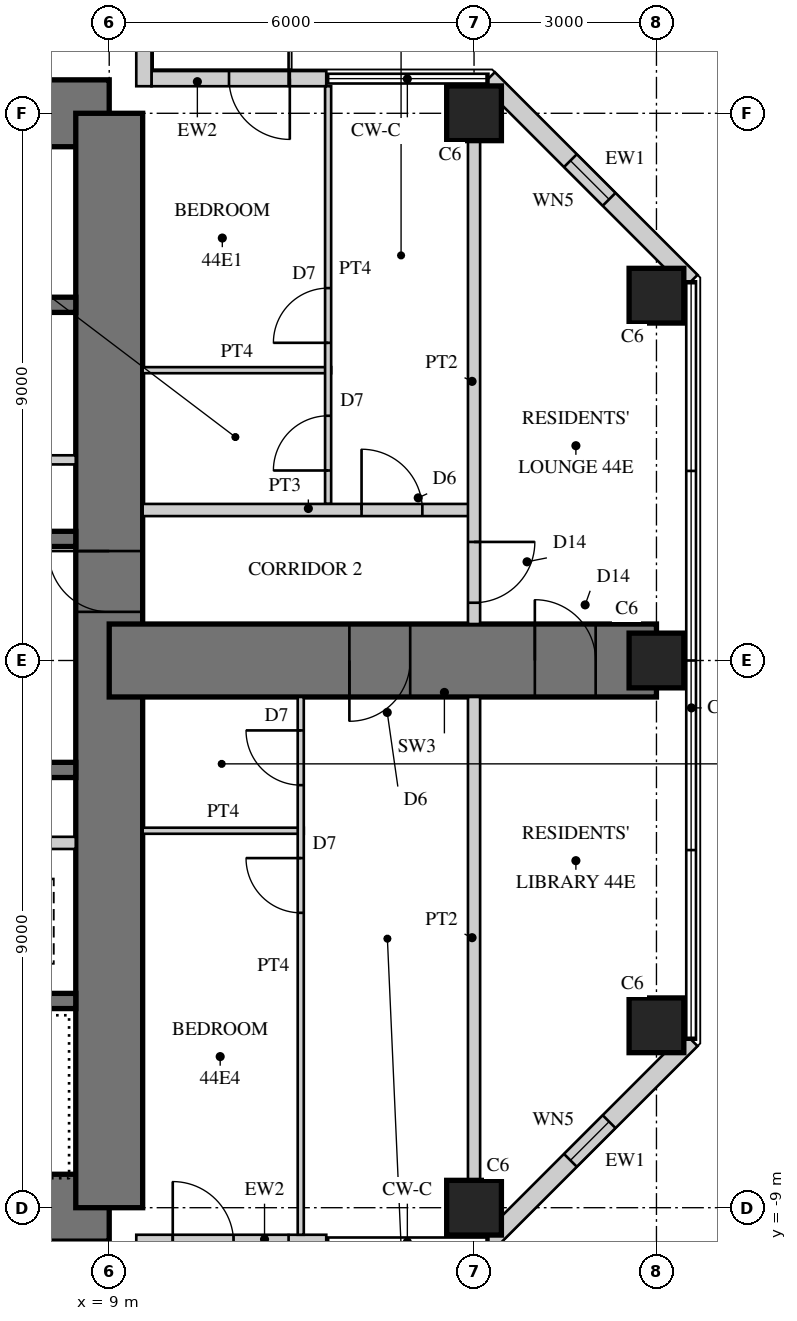
"""IFC4 building model, lengths in metres.
Left out: names, types, materials, properties, quantities, classifications, styles, units other than length and angle.
Written with IfcOpenShell. Run it as: python <this file> out.ifc"""

import sys

from ifc_helpers import new_model, si_unit, direction, frame, frame_2d, origin, origin_2d, place, context, subcontext, project, spatial, rectangle, hollow_rectangle, extrude, element, fill, save


model = new_model("IFC4")
c1 = context("Model", 3, precision=1e-05, world=origin(), true_north=direction((0.0, 1.0)))
c2 = subcontext(c1, "Body", "Model", "MODEL_VIEW")
j1 = project(units=[si_unit("LENGTHUNIT", "METRE"), si_unit("PLANEANGLEUNIT", "RADIAN")], contexts=[c1])
p1 = place(None, origin())
s1 = spatial("IfcSite", under=j1, at=p1, CompositionType="ELEMENT")
p2 = place(p1, origin())
s2 = spatial("IfcBuilding", under=s1, at=p2, CompositionType="ELEMENT")
p3 = place(p2, frame((0.0, 0.0, 179.7)))
s3 = spatial("IfcBuildingStorey", under=s2, at=p3, CompositionType="ELEMENT", Elevation=179.7)
p4 = place(p3, frame((9.0, 9.0, 0.0), z_axis=(0.0, 0.0, 1.0), x_axis=(-1.0, 0.0, 0.0)))
e1 = element("IfcWall", 1, at=p4, inside=s3, PredefinedType="SHEAR", context=c2, shape_type="SweptSolid", body=[
    extrude(rectangle(XDim=18.0, YDim=1.1, at=frame_2d((9.0, 0.0))), origin(), (0.0, 0.0, 1.0), 3.4),
])
p5 = place(p4, frame((9.8, 0.0, 0.0)))
e2 = element("IfcOpeningElement", 2, at=p5, cuts=e1, PredefinedType="OPENING", context=c2, shape_type="SweptSolid", body=[
    extrude(rectangle(XDim=1.0, YDim=2.4, at=frame_2d((0.5, 1.2))), frame((0.0, 0.56, 0.0), z_axis=(0.0, -1.0, 0.0), x_axis=(1.0, 0.0, 0.0)), (0.0, 0.0, 1.0), 1.12),
])
p6 = place(p3, frame((-9.0, -9.0, 0.0), z_axis=(0.0, 0.0, 1.0), x_axis=(1.0, 0.0, 0.0)))
e3 = element("IfcWall", 3, at=p6, inside=s3, PredefinedType="SHEAR", context=c2, shape_type="SweptSolid", body=[
    extrude(rectangle(XDim=18.0, YDim=1.1, at=frame_2d((9.0, 0.0))), origin(), (0.0, 0.0, 1.0), 3.4),
])
p7 = place(p6, frame((9.8, 0.0, 0.0)))
e4 = element("IfcOpeningElement", 4, at=p7, cuts=e3, PredefinedType="OPENING", context=c2, shape_type="SweptSolid", body=[
    extrude(rectangle(XDim=1.0, YDim=2.4, at=frame_2d((0.5, 1.2))), frame((0.0, 0.56, 0.0), z_axis=(0.0, -1.0, 0.0), x_axis=(1.0, 0.0, 0.0)), (0.0, 0.0, 1.0), 1.12),
])
p8 = place(p3, frame((9.0, -9.0, 0.0), z_axis=(0.0, 0.0, 1.0), x_axis=(0.0, 1.0, 0.0)))
e5 = element("IfcWall", 5, at=p8, inside=s3, PredefinedType="SHEAR", context=c2, shape_type="SweptSolid", body=[
    extrude(rectangle(XDim=18.0, YDim=1.1, at=frame_2d((9.0, 0.0))), origin(), (0.0, 0.0, 1.0), 3.4),
])
p9 = place(p8, frame((9.8, 0.0, 0.0)))
e6 = element("IfcOpeningElement", 6, at=p9, cuts=e5, PredefinedType="OPENING", context=c2, shape_type="SweptSolid", body=[
    extrude(rectangle(XDim=1.0, YDim=2.4, at=frame_2d((0.5, 1.2))), frame((0.0, 0.56, 0.0), z_axis=(0.0, -1.0, 0.0), x_axis=(1.0, 0.0, 0.0)), (0.0, 0.0, 1.0), 1.12),
])
p10 = place(p3, frame((1.925, 2.0, 0.0), z_axis=(0.0, 0.0, 1.0), x_axis=(1.0, 0.0, 0.0)))
e7 = element("IfcWall", 7, at=p10, inside=s3, PredefinedType="SHEAR", context=c2, shape_type="SweptSolid", body=[
    extrude(rectangle(XDim=6.525, YDim=0.25, at=frame_2d((3.262, 0.0))), origin(), (0.0, 0.0, 1.0), 3.4),
])
p11 = place(p3, frame((1.925, 5.85, 0.0), z_axis=(0.0, 0.0, 1.0), x_axis=(1.0, 0.0, 0.0)))
e8 = element("IfcWall", 8, at=p11, inside=s3, PredefinedType="SHEAR", context=c2, shape_type="SweptSolid", body=[
    extrude(rectangle(XDim=6.525, YDim=0.25, at=frame_2d((3.262, 0.0))), origin(), (0.0, 0.0, 1.0), 3.4),
])
p12 = place(p11, frame((0.521, 0.0, 0.0)))
e9 = element("IfcOpeningElement", 9, at=p12, cuts=e8, PredefinedType="OPENING", context=c2, shape_type="SweptSolid", body=[
    extrude(rectangle(XDim=1.0, YDim=2.1, at=frame_2d((0.5, 1.05))), frame((0.0, 0.135, 0.0), z_axis=(0.0, -1.0, 0.0), x_axis=(1.0, 0.0, 0.0)), (0.0, 0.0, 1.0), 0.27),
])
p13 = place(p3, frame((1.925, 3.3, 0.0), z_axis=(0.0, 0.0, 1.0), x_axis=(1.0, 0.0, 0.0)))
e10 = element("IfcWall", 10, at=p13, inside=s3, PredefinedType="PARTITIONING", context=c2, shape_type="SweptSolid", body=[
    extrude(rectangle(XDim=6.525, YDim=0.15, at=frame_2d((3.262, 0.0))), origin(), (0.0, 0.0, 1.0), 3.4),
])
p14 = place(p13, frame((0.075, 0.0, 0.0)))
e11 = element("IfcOpeningElement", 11, at=p14, cuts=e10, PredefinedType="OPENING", context=c2, shape_type="SweptSolid", body=[
    extrude(rectangle(XDim=0.8, YDim=2.1, at=frame_2d((0.4, 1.05))), frame((0.0, 0.085, 0.0), z_axis=(0.0, -1.0, 0.0), x_axis=(1.0, 0.0, 0.0)), (0.0, 0.0, 1.0), 0.17),
])
p15 = place(p13, frame((3.675, 0.0, 0.0)))
e12 = element("IfcOpeningElement", 12, at=p15, cuts=e10, PredefinedType="OPENING", context=c2, shape_type="SweptSolid", body=[
    extrude(rectangle(XDim=0.8, YDim=2.1, at=frame_2d((0.4, 1.05))), frame((0.0, 0.085, 0.0), z_axis=(0.0, -1.0, 0.0), x_axis=(1.0, 0.0, 0.0)), (0.0, 0.0, 1.0), 0.17),
])
p16 = place(p3, frame((2.125, -1.8, 0.0), z_axis=(0.0, 0.0, 1.0), x_axis=(1.0, 0.0, 0.0)))
e13 = element("IfcWall", 13, at=p16, inside=s3, PredefinedType="SHEAR", context=c2, shape_type="SweptSolid", body=[
    extrude(rectangle(XDim=6.325, YDim=0.25, at=frame_2d((3.163, 0.0))), origin(), (0.0, 0.0, 1.0), 3.4),
])
p17 = place(p3, frame((2.125, -5.6, 0.0), z_axis=(0.0, 0.0, 1.0), x_axis=(1.0, 0.0, 0.0)))
e14 = element("IfcWall", 14, at=p17, inside=s3, PredefinedType="SHEAR", context=c2, shape_type="SweptSolid", body=[
    extrude(rectangle(XDim=6.325, YDim=0.25, at=frame_2d((3.163, 0.0))), origin(), (0.0, 0.0, 1.0), 3.4),
])
p18 = place(p17, frame((0.175, 0.0, 0.0)))
e15 = element("IfcOpeningElement", 15, at=p18, cuts=e14, PredefinedType="OPENING", context=c2, shape_type="SweptSolid", body=[
    extrude(rectangle(XDim=1.0, YDim=2.1, at=frame_2d((0.5, 1.05))), frame((0.0, 0.135, 0.0), z_axis=(0.0, -1.0, 0.0), x_axis=(1.0, 0.0, 0.0)), (0.0, 0.0, 1.0), 0.27),
])
p19 = place(p3, frame((5.725, -3.0, 0.0), z_axis=(0.0, 0.0, 1.0), x_axis=(1.0, 0.0, 0.0)))
e16 = element("IfcWall", 16, at=p19, inside=s3, PredefinedType="PARTITIONING", context=c2, shape_type="SweptSolid", body=[
    extrude(rectangle(XDim=2.725, YDim=0.2, at=frame_2d((1.362, 0.0))), origin(), (0.0, 0.0, 1.0), 3.4),
])
p20 = place(p3, frame((9.0, 0.0, 0.0), z_axis=(0.0, 0.0, 1.0), x_axis=(1.0, 0.0, 0.0)))
e17 = element("IfcWall", 17, at=p20, inside=s3, PredefinedType="SHEAR", context=c2, shape_type="SweptSolid", body=[
    extrude(rectangle(XDim=9.0, YDim=1.2, at=frame_2d((4.5, 0.0))), origin(), (0.0, 0.0, 1.0), 3.4),
])
p21 = place(p20, frame((3.95, 0.0, 0.0)))
e18 = element("IfcOpeningElement", 18, at=p21, cuts=e17, PredefinedType="OPENING", context=c2, shape_type="SweptSolid", body=[
    extrude(rectangle(XDim=1.0, YDim=2.15, at=frame_2d((0.5, 1.075))), frame((0.0, 0.61, 0.0), z_axis=(0.0, -1.0, 0.0), x_axis=(1.0, 0.0, 0.0)), (0.0, 0.0, 1.0), 1.22),
])
p22 = place(p20, frame((7.0, 0.0, 0.0)))
e19 = element("IfcOpeningElement", 19, at=p22, cuts=e17, PredefinedType="OPENING", context=c2, shape_type="SweptSolid", body=[
    extrude(rectangle(XDim=1.0, YDim=2.2, at=frame_2d((0.5, 1.1))), frame((0.0, 0.61, 0.0), z_axis=(0.0, -1.0, 0.0), x_axis=(1.0, 0.0, 0.0)), (0.0, 0.0, 1.0), 1.22),
])
for number, where, z_axis, x_axis in (
    (20, (15.0, -9.0, 0.0), (0.0, 0.0, 1.0), (1.0, 0.0, 0.0)),
    (21, (15.0, 9.0, 0.0), (0.0, 0.0, 1.0), (1.0, 0.0, 0.0)),
    (22, (18.0, -6.0, 0.0), (0.0, 0.0, 1.0), (1.0, 0.0, 0.0)),
    (23, (18.0, 0.0, 0.0), (0.0, 0.0, 1.0), (1.0, 0.0, 0.0)),
    (24, (18.0, 6.0, 0.0), (0.0, 0.0, 1.0), (1.0, 0.0, 0.0)),
):
    element("IfcColumn", number, at=place(p3, frame(where, z_axis=z_axis, x_axis=x_axis)), inside=s3, PredefinedType="COLUMN", context=c2, shape_type="SweptSolid", body=[
        extrude(rectangle(XDim=0.9, YDim=0.9, at=origin_2d()), origin(), (0.0, 0.0, 1.0), 3.4),
    ])
p23 = place(p3, frame((9.445, -9.57, 0.0), z_axis=(0.0, 0.0, 1.0), x_axis=(1.0, 0.0, 0.0)))
e25 = element("IfcWall", 25, at=p23, inside=s3, PredefinedType="SOLIDWALL", context=c2, shape_type="SweptSolid", body=[
    extrude(rectangle(XDim=3.125, YDim=0.25, at=frame_2d((1.562, 0.0))), origin(), (0.0, 0.0, 1.0), 3.22),
])
p24 = place(p23, frame((0.6, 0.0, 0.0)))
e26 = element("IfcOpeningElement", 26, at=p24, cuts=e25, PredefinedType="OPENING", context=c2, shape_type="SweptSolid", body=[
    extrude(rectangle(XDim=1.0, YDim=2.2, at=frame_2d((0.5, 1.1))), frame((0.0, 0.135, 0.0), z_axis=(0.0, -1.0, 0.0), x_axis=(1.0, 0.0, 0.0)), (0.0, 0.0, 1.0), 0.27),
])
p25 = place(p3, frame((15.236, -9.57, 0.0), z_axis=(0.0, 0.0, 1.0), x_axis=(0.707106781187, 0.707106781187, 0.0)))
e27 = element("IfcWall", 27, at=p25, inside=s3, PredefinedType="SOLIDWALL", context=c2, shape_type="SweptSolid", body=[
    extrude(rectangle(XDim=4.715, YDim=0.3, at=frame_2d((2.357, 0.0))), origin(), (0.0, 0.0, 1.0), 3.22),
])
p26 = place(p25, frame((1.907, 0.0, 0.3)))
e28 = element("IfcOpeningElement", 28, at=p26, cuts=e27, PredefinedType="OPENING", context=c2, shape_type="SweptSolid", body=[
    extrude(rectangle(XDim=0.9, YDim=2.4, at=frame_2d((0.45, 1.2))), frame((0.0, 0.16, 0.0), z_axis=(0.0, -1.0, 0.0), x_axis=(1.0, 0.0, 0.0)), (0.0, 0.0, 1.0), 0.32),
])
p27 = place(p3, frame((18.57, 6.236, 0.0), z_axis=(0.0, 0.0, 1.0), x_axis=(-0.707106781187, 0.707106781187, 0.0)))
e29 = element("IfcWall", 29, at=p27, inside=s3, PredefinedType="SOLIDWALL", context=c2, shape_type="SweptSolid", body=[
    extrude(rectangle(XDim=4.715, YDim=0.3, at=frame_2d((2.357, 0.0))), origin(), (0.0, 0.0, 1.0), 3.22),
])
p28 = place(p27, frame((1.907, 0.0, 0.3)))
e30 = element("IfcOpeningElement", 30, at=p28, cuts=e29, PredefinedType="OPENING", context=c2, shape_type="SweptSolid", body=[
    extrude(rectangle(XDim=0.9, YDim=2.4, at=frame_2d((0.45, 1.2))), frame((0.0, 0.16, 0.0), z_axis=(0.0, -1.0, 0.0), x_axis=(1.0, 0.0, 0.0)), (0.0, 0.0, 1.0), 0.32),
])
p29 = place(p3, frame((12.57, 9.57, 0.0), z_axis=(0.0, 0.0, 1.0), x_axis=(-1.0, 0.0, 0.0)))
e31 = element("IfcWall", 31, at=p29, inside=s3, PredefinedType="SOLIDWALL", context=c2, shape_type="SweptSolid", body=[
    extrude(rectangle(XDim=2.875, YDim=0.25, at=frame_2d((1.438, 0.0))), origin(), (0.0, 0.0, 1.0), 3.22),
])
p30 = place(p29, frame((0.6, 0.0, 0.0)))
e32 = element("IfcOpeningElement", 32, at=p30, cuts=e31, PredefinedType="OPENING", context=c2, shape_type="SweptSolid", body=[
    extrude(rectangle(XDim=1.0, YDim=2.2, at=frame_2d((0.5, 1.1))), frame((0.0, 0.135, 0.0), z_axis=(0.0, -1.0, 0.0), x_axis=(1.0, 0.0, 0.0)), (0.0, 0.0, 1.0), 0.27),
])
p31 = place(p3, frame((9.57, 9.445, 0.0), z_axis=(0.0, 0.0, 1.0), x_axis=(0.0, 1.0, 0.0)))
e33 = element("IfcWall", 33, at=p31, inside=s3, PredefinedType="SOLIDWALL", context=c2, shape_type="SweptSolid", body=[
    extrude(rectangle(XDim=3.125, YDim=0.25, at=frame_2d((1.562, 0.0))), origin(), (0.0, 0.0, 1.0), 3.22),
])
p32 = place(p31, frame((0.6, 0.0, 0.0)))
e34 = element("IfcOpeningElement", 34, at=p32, cuts=e33, PredefinedType="OPENING", context=c2, shape_type="SweptSolid", body=[
    extrude(rectangle(XDim=1.0, YDim=2.2, at=frame_2d((0.5, 1.1))), frame((0.0, 0.135, 0.0), z_axis=(0.0, -1.0, 0.0), x_axis=(1.0, 0.0, 0.0)), (0.0, 0.0, 1.0), 0.27),
])
p33 = place(p3, frame((9.55, 4.775, 0.0), z_axis=(0.0, 0.0, 1.0), x_axis=(1.0, 0.0, 0.0)))
e35 = element("IfcWall", 35, at=p33, inside=s3, PredefinedType="PARTITIONING", context=c2, shape_type="SweptSolid", body=[
    extrude(rectangle(XDim=3.1, YDim=0.1, at=frame_2d((1.55, 0.0))), origin(), (0.0, 0.0, 1.0), 3.22),
])
p34 = place(p3, frame((12.6, 2.575, 0.0), z_axis=(0.0, 0.0, 1.0), x_axis=(0.0, 1.0, 0.0)))
e36 = element("IfcWall", 36, at=p34, inside=s3, PredefinedType="PARTITIONING", context=c2, shape_type="SweptSolid", body=[
    extrude(rectangle(XDim=6.87, YDim=0.1, at=frame_2d((3.435, 0.0))), origin(), (0.0, 0.0, 1.0), 3.22),
])
p35 = place(p34, frame((0.55, 0.0, 0.0)))
e37 = element("IfcOpeningElement", 37, at=p35, cuts=e36, PredefinedType="OPENING", context=c2, shape_type="SweptSolid", body=[
    extrude(rectangle(XDim=0.9, YDim=2.1, at=frame_2d((0.45, 1.05))), frame((0.0, 0.06, 0.0), z_axis=(0.0, -1.0, 0.0), x_axis=(1.0, 0.0, 0.0)), (0.0, 0.0, 1.0), 0.12),
])
p36 = place(p34, frame((2.65, 0.0, 0.0)))
e38 = element("IfcOpeningElement", 38, at=p36, cuts=e36, PredefinedType="OPENING", context=c2, shape_type="SweptSolid", body=[
    extrude(rectangle(XDim=0.9, YDim=2.1, at=frame_2d((0.45, 1.05))), frame((0.0, 0.06, 0.0), z_axis=(0.0, -1.0, 0.0), x_axis=(1.0, 0.0, 0.0)), (0.0, 0.0, 1.0), 0.12),
])
p37 = place(p3, frame((9.55, -2.8, 0.0), z_axis=(0.0, 0.0, 1.0), x_axis=(1.0, 0.0, 0.0)))
e39 = element("IfcWall", 39, at=p37, inside=s3, PredefinedType="PARTITIONING", context=c2, shape_type="SweptSolid", body=[
    extrude(rectangle(XDim=2.65, YDim=0.1, at=frame_2d((1.325, 0.0))), origin(), (0.0, 0.0, 1.0), 3.22),
])
p38 = place(p3, frame((12.15, -9.445, 0.0), z_axis=(0.0, 0.0, 1.0), x_axis=(0.0, 1.0, 0.0)))
e40 = element("IfcWall", 40, at=p38, inside=s3, PredefinedType="PARTITIONING", context=c2, shape_type="SweptSolid", body=[
    extrude(rectangle(XDim=8.845, YDim=0.1, at=frame_2d((4.422, 0.0))), origin(), (0.0, 0.0, 1.0), 3.22),
])
p39 = place(p38, frame((5.295, 0.0, 0.0)))
e41 = element("IfcOpeningElement", 41, at=p39, cuts=e40, PredefinedType="OPENING", context=c2, shape_type="SweptSolid", body=[
    extrude(rectangle(XDim=0.9, YDim=2.1, at=frame_2d((0.45, 1.05))), frame((0.0, 0.06, 0.0), z_axis=(0.0, -1.0, 0.0), x_axis=(1.0, 0.0, 0.0)), (0.0, 0.0, 1.0), 0.12),
])
p40 = place(p38, frame((7.395, 0.0, 0.0)))
e42 = element("IfcOpeningElement", 42, at=p40, cuts=e40, PredefinedType="OPENING", context=c2, shape_type="SweptSolid", body=[
    extrude(rectangle(XDim=0.9, YDim=2.1, at=frame_2d((0.45, 1.05))), frame((0.0, 0.06, 0.0), z_axis=(0.0, -1.0, 0.0), x_axis=(1.0, 0.0, 0.0)), (0.0, 0.0, 1.0), 0.12),
])
p41 = place(p3, frame((9.55, 2.475, 0.0), z_axis=(0.0, 0.0, 1.0), x_axis=(1.0, 0.0, 0.0)))
e43 = element("IfcWall", 43, at=p41, inside=s3, PredefinedType="SOLIDWALL", context=c2, shape_type="SweptSolid", body=[
    extrude(rectangle(XDim=5.45, YDim=0.2, at=frame_2d((2.725, 0.0))), origin(), (0.0, 0.0, 1.0), 3.22),
])
p42 = place(p41, frame((3.6, 0.0, 0.0)))
e44 = element("IfcOpeningElement", 44, at=p42, cuts=e43, PredefinedType="OPENING", context=c2, shape_type="SweptSolid", body=[
    extrude(rectangle(XDim=1.0, YDim=2.15, at=frame_2d((0.5, 1.075))), frame((0.0, 0.11, 0.0), z_axis=(0.0, -1.0, 0.0), x_axis=(1.0, 0.0, 0.0)), (0.0, 0.0, 1.0), 0.22),
])
p43 = place(p3, frame((15.0, -8.55, 0.0), z_axis=(0.0, 0.0, 1.0), x_axis=(0.0, 1.0, 0.0)))
e45 = element("IfcWall", 45, at=p43, inside=s3, PredefinedType="SOLIDWALL", context=c2, shape_type="SweptSolid", body=[
    extrude(rectangle(XDim=7.95, YDim=0.2, at=frame_2d((3.975, 0.0))), origin(), (0.0, 0.0, 1.0), 2.47),
])
p44 = place(p3, frame((15.0, 0.6, 0.0), z_axis=(0.0, 0.0, 1.0), x_axis=(0.0, 1.0, 0.0)))
e46 = element("IfcWall", 46, at=p44, inside=s3, PredefinedType="SOLIDWALL", context=c2, shape_type="SweptSolid", body=[
    extrude(rectangle(XDim=7.95, YDim=0.2, at=frame_2d((3.975, 0.0))), origin(), (0.0, 0.0, 1.0), 2.47),
])
p45 = place(p44, frame((0.35, 0.0, 0.0)))
e47 = element("IfcOpeningElement", 47, at=p45, cuts=e46, PredefinedType="OPENING", context=c2, shape_type="SweptSolid", body=[
    extrude(rectangle(XDim=1.0, YDim=2.2, at=frame_2d((0.5, 1.1))), frame((0.0, 0.11, 0.0), z_axis=(0.0, -1.0, 0.0), x_axis=(1.0, 0.0, 0.0)), (0.0, 0.0, 1.0), 0.22),
])
p46 = place(p24, origin())
e48 = element("IfcDoor", 48, at=p46, inside=s3, OperationType="SINGLE_SWING_LEFT", PredefinedType="DOOR", context=c2, shape_type="SweptSolid", body=[
    extrude(hollow_rectangle(XDim=1.0, YDim=2.2, WallThickness=0.06, at=frame_2d((0.5, 1.1))), frame((0.0, 0.025, 0.0), z_axis=(0.0, -1.0, 0.0), x_axis=(1.0, 0.0, 0.0)), (0.0, 0.0, 1.0), 0.05),
    extrude(rectangle(XDim=0.879, YDim=2.079, at=frame_2d((0.5, 1.1))), frame((0.0, 0.025, 0.0), z_axis=(0.0, -1.0, 0.0), x_axis=(1.0, 0.0, 0.0)), (0.0, 0.0, 1.0), 0.05),
])
fill(e26, e48)
p47 = place(p26, origin())
e49 = element("IfcWindow", 49, at=p47, inside=s3, PartitioningType="SINGLE_PANEL", PredefinedType="WINDOW", context=c2, shape_type="SweptSolid", body=[
    extrude(hollow_rectangle(XDim=0.9, YDim=2.4, WallThickness=0.06, at=frame_2d((0.45, 1.2))), frame((0.0, 0.03, 0.0), z_axis=(0.0, -1.0, 0.0), x_axis=(1.0, 0.0, 0.0)), (0.0, 0.0, 1.0), 0.06),
    extrude(rectangle(XDim=0.779, YDim=2.279, at=frame_2d((0.45, 1.2))), frame((0.0, 0.03, 0.0), z_axis=(0.0, -1.0, 0.0), x_axis=(1.0, 0.0, 0.0)), (0.0, 0.0, 1.0), 0.06),
])
fill(e28, e49)
p48 = place(p28, origin())
e50 = element("IfcWindow", 50, at=p48, inside=s3, PartitioningType="SINGLE_PANEL", PredefinedType="WINDOW", context=c2, shape_type="SweptSolid", body=[
    extrude(hollow_rectangle(XDim=0.9, YDim=2.4, WallThickness=0.06, at=frame_2d((0.45, 1.2))), frame((0.0, 0.03, 0.0), z_axis=(0.0, -1.0, 0.0), x_axis=(1.0, 0.0, 0.0)), (0.0, 0.0, 1.0), 0.06),
    extrude(rectangle(XDim=0.779, YDim=2.279, at=frame_2d((0.45, 1.2))), frame((0.0, 0.03, 0.0), z_axis=(0.0, -1.0, 0.0), x_axis=(1.0, 0.0, 0.0)), (0.0, 0.0, 1.0), 0.06),
])
fill(e30, e50)
p49 = place(p30, origin())
e51 = element("IfcDoor", 51, at=p49, inside=s3, OperationType="SINGLE_SWING_LEFT", PredefinedType="DOOR", context=c2, shape_type="SweptSolid", body=[
    extrude(hollow_rectangle(XDim=1.0, YDim=2.2, WallThickness=0.06, at=frame_2d((0.5, 1.1))), frame((0.0, 0.025, 0.0), z_axis=(0.0, -1.0, 0.0), x_axis=(1.0, 0.0, 0.0)), (0.0, 0.0, 1.0), 0.05),
    extrude(rectangle(XDim=0.879, YDim=2.079, at=frame_2d((0.5, 1.1))), frame((0.0, 0.025, 0.0), z_axis=(0.0, -1.0, 0.0), x_axis=(1.0, 0.0, 0.0)), (0.0, 0.0, 1.0), 0.05),
])
fill(e32, e51)
p50 = place(p35, origin())
e52 = element("IfcDoor", 52, at=p50, inside=s3, OperationType="SINGLE_SWING_LEFT", PredefinedType="DOOR", context=c2, shape_type="SweptSolid", body=[
    extrude(rectangle(XDim=0.9, YDim=2.1, at=frame_2d((0.45, 1.05))), frame((0.0, 0.025, 0.0), z_axis=(0.0, -1.0, 0.0), x_axis=(1.0, 0.0, 0.0)), (0.0, 0.0, 1.0), 0.05),
])
fill(e37, e52)
p51 = place(p36, origin())
e53 = element("IfcDoor", 53, at=p51, inside=s3, OperationType="SINGLE_SWING_LEFT", PredefinedType="DOOR", context=c2, shape_type="SweptSolid", body=[
    extrude(rectangle(XDim=0.9, YDim=2.1, at=frame_2d((0.45, 1.05))), frame((0.0, 0.025, 0.0), z_axis=(0.0, -1.0, 0.0), x_axis=(1.0, 0.0, 0.0)), (0.0, 0.0, 1.0), 0.05),
])
fill(e38, e53)
p52 = place(p39, origin())
e54 = element("IfcDoor", 54, at=p52, inside=s3, OperationType="SINGLE_SWING_RIGHT", PredefinedType="DOOR", context=c2, shape_type="SweptSolid", body=[
    extrude(rectangle(XDim=0.9, YDim=2.1, at=frame_2d((0.45, 1.05))), frame((0.0, 0.025, 0.0), z_axis=(0.0, -1.0, 0.0), x_axis=(1.0, 0.0, 0.0)), (0.0, 0.0, 1.0), 0.05),
])
fill(e41, e54)
p53 = place(p40, origin())
e55 = element("IfcDoor", 55, at=p53, inside=s3, OperationType="SINGLE_SWING_RIGHT", PredefinedType="DOOR", context=c2, shape_type="SweptSolid", body=[
    extrude(rectangle(XDim=0.9, YDim=2.1, at=frame_2d((0.45, 1.05))), frame((0.0, 0.025, 0.0), z_axis=(0.0, -1.0, 0.0), x_axis=(1.0, 0.0, 0.0)), (0.0, 0.0, 1.0), 0.05),
])
fill(e42, e55)
p54 = place(p42, origin())
e56 = element("IfcDoor", 56, at=p54, inside=s3, OperationType="SINGLE_SWING_LEFT", PredefinedType="DOOR", context=c2, shape_type="SweptSolid", body=[
    extrude(rectangle(XDim=1.0, YDim=2.15, at=frame_2d((0.5, 1.075))), frame((0.0, 0.025, 0.0), z_axis=(0.0, -1.0, 0.0), x_axis=(1.0, 0.0, 0.0)), (0.0, 0.0, 1.0), 0.05),
])
fill(e44, e56)
p55 = place(p45, frame((1.0, 0.0, 0.0), z_axis=(0.0, 0.0, 1.0), x_axis=(-1.0, 0.0, 0.0)))
e57 = element("IfcDoor", 57, at=p55, inside=s3, OperationType="SINGLE_SWING_LEFT", PredefinedType="DOOR", context=c2, shape_type="SweptSolid", body=[
    extrude(rectangle(XDim=1.0, YDim=2.2, at=frame_2d((0.5, 1.1))), frame((0.0, 0.025, 0.0), z_axis=(0.0, -1.0, 0.0), x_axis=(1.0, 0.0, 0.0)), (0.0, 0.0, 1.0), 0.05),
])
fill(e47, e57)
p56 = place(p21, frame((1.0, 0.0, 0.0), z_axis=(0.0, 0.0, 1.0), x_axis=(-1.0, 0.0, 0.0)))
e58 = element("IfcDoor", 58, at=p56, inside=s3, OperationType="SINGLE_SWING_RIGHT", PredefinedType="DOOR", context=c2, shape_type="SweptSolid", body=[
    extrude(rectangle(XDim=1.0, YDim=2.15, at=frame_2d((0.5, 1.075))), frame((0.0, 0.025, 0.0), z_axis=(0.0, -1.0, 0.0), x_axis=(1.0, 0.0, 0.0)), (0.0, 0.0, 1.0), 0.05),
])
fill(e18, e58)
p57 = place(p22, origin())
e59 = element("IfcDoor", 59, at=p57, inside=s3, OperationType="SINGLE_SWING_LEFT", PredefinedType="DOOR", context=c2, shape_type="SweptSolid", body=[
    extrude(rectangle(XDim=1.0, YDim=2.2, at=frame_2d((0.5, 1.1))), frame((0.0, 0.025, 0.0), z_axis=(0.0, -1.0, 0.0), x_axis=(1.0, 0.0, 0.0)), (0.0, 0.0, 1.0), 0.05),
])
fill(e19, e59)
p58 = place(p9, origin())
e60 = element("IfcDoor", 60, at=p58, inside=s3, OperationType="SINGLE_SWING_RIGHT", PredefinedType="DOOR", context=c2, shape_type="SweptSolid", body=[
    extrude(rectangle(XDim=1.0, YDim=2.4, at=frame_2d((0.5, 1.2))), frame((0.0, 0.055, 0.0), z_axis=(0.0, -1.0, 0.0), x_axis=(1.0, 0.0, 0.0)), (0.0, 0.0, 1.0), 0.05),
])
fill(e6, e60)
save(model, sys.argv[1])
